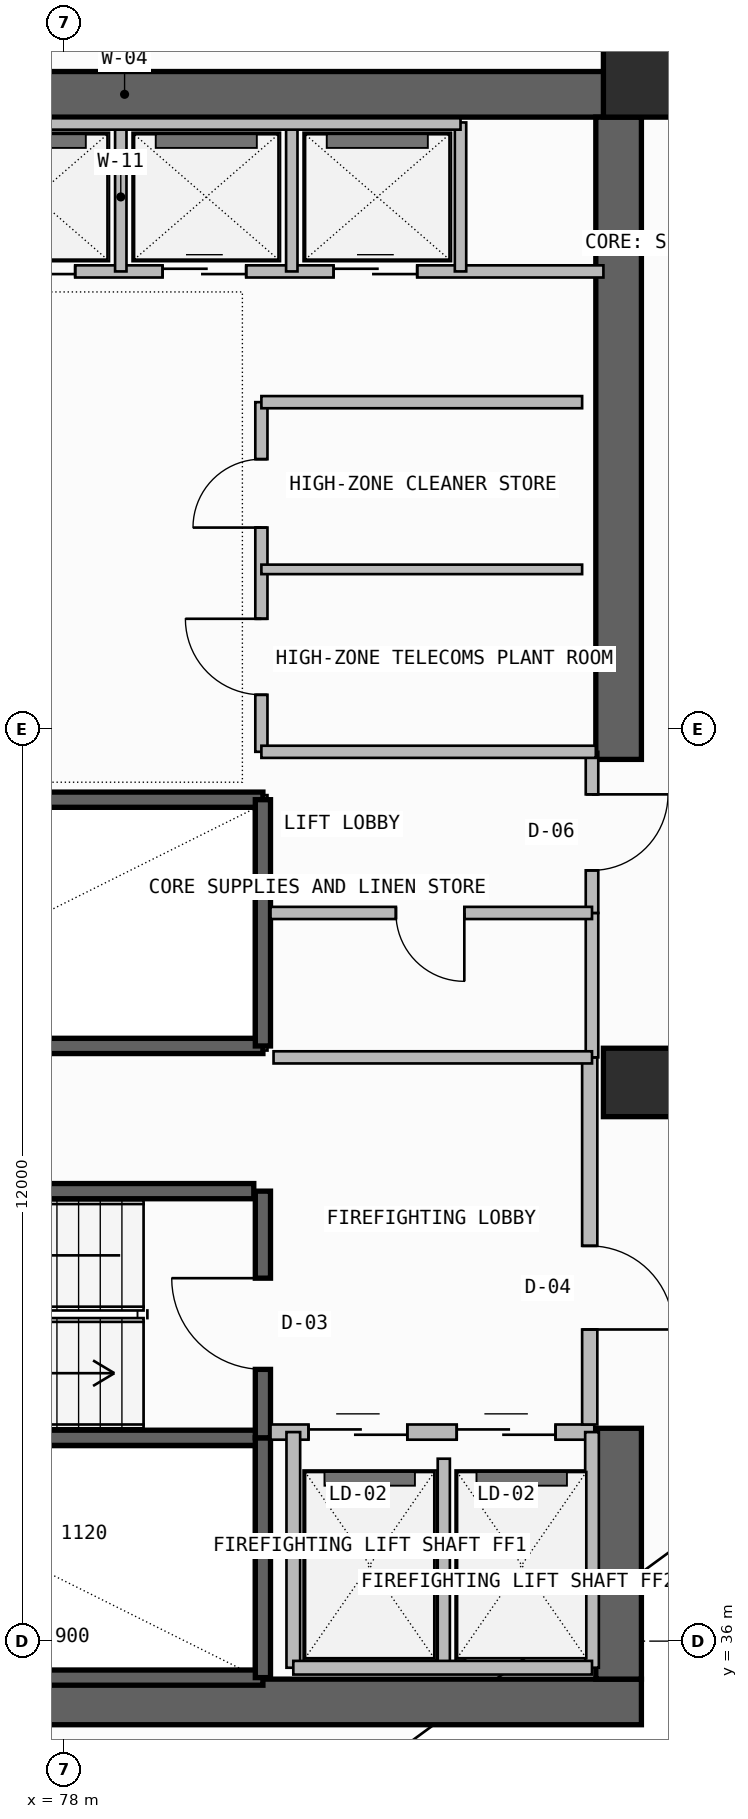
"""IFC4 building model, lengths in metres.
Left out: names, types, materials, properties, quantities, classifications, styles, units other than length and angle.
Written with IfcOpenShell. Run it as: python <this file> out.ifc"""

import sys

from ifc_helpers import new_model, si_unit, direction, frame, frame_2d, origin, origin_2d, place, context, subcontext, project, spatial, rectangle, extrude, element, fill, save


model = new_model("IFC4")
c1 = context("Model", 3, precision=1e-05, world=origin(), true_north=direction((0.0, 1.0)))
c2 = subcontext(c1, "Body", "Model", "MODEL_VIEW")
j1 = project(units=[si_unit("LENGTHUNIT", "METRE"), si_unit("PLANEANGLEUNIT", "RADIAN")], contexts=[c1])
p1 = place(None, origin())
s1 = spatial("IfcSite", under=j1, at=p1, CompositionType="ELEMENT")
p2 = place(p1, origin())
s2 = spatial("IfcBuilding", under=s1, at=p2, CompositionType="ELEMENT")
p3 = place(p2, frame((0.0, 0.0, 243.14)))
s3 = spatial("IfcBuildingStorey", under=s2, at=p3, CompositionType="ELEMENT", Elevation=243.14)
p4 = place(p3, frame((72.3, 35.2, -0.26), z_axis=(0.0, 0.0, 1.0), x_axis=(1.0, 0.0, 0.0)))
e1 = element("IfcWall", 1, at=p4, inside=s3, PredefinedType="SHEAR", context=c2, shape_type="SweptSolid", body=[
    extrude(rectangle(XDim=13.3, YDim=0.6, at=frame_2d((6.65, 0.0))), origin(), (0.0, 0.0, 1.0), 3.52),
])
p5 = place(p3, frame((85.3, 35.5, -0.26), z_axis=(0.0, 0.0, 1.0), x_axis=(0.0, 1.0, 0.0)))
e2 = element("IfcWall", 2, at=p5, inside=s3, PredefinedType="SHEAR", context=c2, shape_type="SweptSolid", body=[
    extrude(rectangle(XDim=3.3, YDim=0.6, at=frame_2d((1.65, 0.0))), origin(), (0.0, 0.0, 1.0), 3.52),
])
p6 = place(p3, frame((72.0, 56.35, -0.26), z_axis=(0.0, 0.0, 1.0), x_axis=(1.0, 0.0, 0.0)))
e3 = element("IfcWall", 3, at=p6, inside=s3, PredefinedType="SHEAR", context=c2, shape_type="SweptSolid", body=[
    extrude(rectangle(XDim=13.6, YDim=0.6, at=frame_2d((6.8, 0.0))), origin(), (0.0, 0.0, 1.0), 3.52),
])
p7 = place(p3, frame((85.3, 47.6, -0.26), z_axis=(0.0, 0.0, 1.0), x_axis=(0.0, 1.0, 0.0)))
e4 = element("IfcWall", 4, at=p7, inside=s3, PredefinedType="SHEAR", context=c2, shape_type="SweptSolid", body=[
    extrude(rectangle(XDim=8.45, YDim=0.6, at=frame_2d((4.225, 0.0))), origin(), (0.0, 0.0, 1.0), 3.52),
])
for number, where, z_axis, x_axis in (
    (5, (85.55, 43.35, 0.0), (0.0, 0.0, 1.0), (1.0, 0.0, 0.0)),
    (6, (85.55, 56.5, 0.0), (0.0, 0.0, 1.0), (1.0, 0.0, 0.0)),
):
    element("IfcColumn", number, at=place(p3, frame(where, z_axis=z_axis, x_axis=x_axis)), inside=s3, PredefinedType="COLUMN", context=c2, shape_type="SweptSolid", body=[
        extrude(rectangle(XDim=0.9, YDim=0.9, at=origin_2d()), origin(), (0.0, 0.0, 1.0), 3.52),
    ])
for number, where, z_axis, x_axis in (
    (7, (72.92, 35.52, -0.26), (0.0, 0.0, 1.0), (1.0, 0.0, 0.0)),
    (8, (72.92, 38.675, -0.26), (0.0, 0.0, 1.0), (1.0, 0.0, 0.0)),
):
    element("IfcWall", number, at=place(p3, frame(where, z_axis=z_axis, x_axis=x_axis)), inside=s3, PredefinedType="SOLIDWALL", context=c2, shape_type="SweptSolid", body=[
        extrude(rectangle(XDim=7.7, YDim=0.2, at=frame_2d((3.85, 0.0))), origin(), (0.0, 0.0, 1.0), 3.52),
    ])
p8 = place(p3, frame((80.62, 35.52, -0.26), z_axis=(0.0, 0.0, 1.0), x_axis=(0.0, 1.0, 0.0)))
e9 = element("IfcWall", 9, at=p8, inside=s3, PredefinedType="SOLIDWALL", context=c2, shape_type="SweptSolid", body=[
    extrude(rectangle(XDim=3.155, YDim=0.2, at=frame_2d((1.578, 0.0))), origin(), (0.0, 0.0, 1.0), 3.52),
])
p9 = place(p3, frame((80.62, 38.675, -0.26), z_axis=(0.0, 0.0, 1.0), x_axis=(0.0, 1.0, 0.0)))
e10 = element("IfcWall", 10, at=p9, inside=s3, PredefinedType="SOLIDWALL", context=c2, shape_type="SweptSolid", body=[
    extrude(rectangle(XDim=3.245, YDim=0.2, at=frame_2d((1.623, 0.0))), origin(), (0.0, 0.0, 1.0), 3.52),
])
p10 = place(p9, frame((0.9, 0.0, 0.26)))
e11 = element("IfcOpeningElement", 11, at=p10, cuts=e10, PredefinedType="OPENING", context=c2, shape_type="SweptSolid", body=[
    extrude(rectangle(XDim=1.2, YDim=2.2, at=frame_2d((0.6, 1.1))), frame((0.0, 0.11, 0.0), z_axis=(0.0, -1.0, 0.0), x_axis=(1.0, 0.0, 0.0)), (0.0, 0.0, 1.0), 0.22),
])
p11 = place(p3, frame((80.72, 38.75, 0.0), z_axis=(0.0, 0.0, 1.0), x_axis=(1.0, 0.0, 0.0)))
e12 = element("IfcWall", 12, at=p11, inside=s3, PredefinedType="SOLIDWALL", context=c2, shape_type="SweptSolid", body=[
    extrude(rectangle(XDim=4.26, YDim=0.2, at=frame_2d((2.13, 0.0))), origin(), (0.0, 0.0, 1.0), 3.26),
])
p12 = place(p11, frame((0.5, 0.0, 0.0)))
e13 = element("IfcOpeningElement", 13, at=p12, cuts=e12, PredefinedType="OPENING", context=c2, shape_type="SweptSolid", body=[
    extrude(rectangle(XDim=1.3, YDim=2.3, at=frame_2d((0.65, 1.15))), frame((0.0, 0.11, 0.0), z_axis=(0.0, -1.0, 0.0), x_axis=(1.0, 0.0, 0.0)), (0.0, 0.0, 1.0), 0.22),
])
p13 = place(p11, frame((2.45, 0.0, 0.0)))
e14 = element("IfcOpeningElement", 14, at=p13, cuts=e12, PredefinedType="OPENING", context=c2, shape_type="SweptSolid", body=[
    extrude(rectangle(XDim=1.3, YDim=2.3, at=frame_2d((0.65, 1.15))), frame((0.0, 0.11, 0.0), z_axis=(0.0, -1.0, 0.0), x_axis=(1.0, 0.0, 0.0)), (0.0, 0.0, 1.0), 0.22),
])
p14 = place(p3, frame((83.0, 35.65, 0.0), z_axis=(0.0, 0.0, 1.0), x_axis=(0.0, 1.0, 0.0)))
e15 = element("IfcWall", 15, at=p14, inside=s3, PredefinedType="PLUMBINGWALL", context=c2, shape_type="SweptSolid", body=[
    extrude(rectangle(XDim=2.75, YDim=0.16, at=frame_2d((1.375, 0.0))), origin(), (0.0, 0.0, 1.0), 3.26),
])
for number, where, z_axis, x_axis in (
    (16, (84.95, 35.65, 0.0), (0.0, 0.0, 1.0), (0.0, 1.0, 0.0)),
    (17, (81.02, 35.65, 0.0), (0.0, 0.0, 1.0), (0.0, 1.0, 0.0)),
):
    element("IfcWall", number, at=place(p3, frame(where, z_axis=z_axis, x_axis=x_axis)), inside=s3, PredefinedType="SOLIDWALL", context=c2, shape_type="SweptSolid", body=[
        extrude(rectangle(XDim=3.1, YDim=0.18, at=frame_2d((1.55, 0.0))), origin(), (0.0, 0.0, 1.0), 3.26),
    ])
p15 = place(p3, frame((81.02, 35.65, 0.0), z_axis=(0.0, 0.0, 1.0), x_axis=(1.0, 0.0, 0.0)))
e18 = element("IfcWall", 18, at=p15, inside=s3, PredefinedType="SOLIDWALL", context=c2, shape_type="SweptSolid", body=[
    extrude(rectangle(XDim=3.93, YDim=0.18, at=frame_2d((1.965, 0.0))), origin(), (0.0, 0.0, 1.0), 3.26),
])
p16 = place(p3, frame((84.92, 38.85, 0.0), z_axis=(0.0, 0.0, 1.0), x_axis=(0.0, 1.0, 0.0)))
e19 = element("IfcWall", 19, at=p16, inside=s3, PredefinedType="SOLIDWALL", context=c2, shape_type="SweptSolid", body=[
    extrude(rectangle(XDim=4.83, YDim=0.2, at=frame_2d((2.415, 0.0))), origin(), (0.0, 0.0, 1.0), 3.26),
])
p17 = place(p16, frame((1.25, 0.0, 0.0)))
e20 = element("IfcOpeningElement", 20, at=p17, cuts=e19, PredefinedType="OPENING", context=c2, shape_type="SweptSolid", body=[
    extrude(rectangle(XDim=1.1, YDim=2.2, at=frame_2d((0.55, 1.1))), frame((0.0, 0.11, 0.0), z_axis=(0.0, -1.0, 0.0), x_axis=(1.0, 0.0, 0.0)), (0.0, 0.0, 1.0), 0.22),
])
p18 = place(p3, frame((72.92, 41.92, -0.26), z_axis=(0.0, 0.0, 1.0), x_axis=(1.0, 0.0, 0.0)))
e21 = element("IfcWall", 21, at=p18, inside=s3, PredefinedType="SOLIDWALL", context=c2, shape_type="SweptSolid", body=[
    extrude(rectangle(XDim=7.58, YDim=0.2, at=frame_2d((3.79, 0.0))), origin(), (0.0, 0.0, 1.0), 3.52),
])
for number, where, z_axis, x_axis in (
    (22, (72.92, 43.83, -0.26), (0.0, 0.0, 1.0), (1.0, 0.0, 0.0)),
    (23, (72.92, 47.07, -0.26), (0.0, 0.0, 1.0), (1.0, 0.0, 0.0)),
):
    element("IfcWall", number, at=place(p3, frame(where, z_axis=z_axis, x_axis=x_axis)), inside=s3, PredefinedType="SOLIDWALL", context=c2, shape_type="SweptSolid", body=[
        extrude(rectangle(XDim=7.7, YDim=0.2, at=frame_2d((3.85, 0.0))), origin(), (0.0, 0.0, 1.0), 3.52),
    ])
p19 = place(p3, frame((80.62, 43.83, -0.26), z_axis=(0.0, 0.0, 1.0), x_axis=(0.0, 1.0, 0.0)))
e24 = element("IfcWall", 24, at=p19, inside=s3, PredefinedType="SOLIDWALL", context=c2, shape_type="SweptSolid", body=[
    extrude(rectangle(XDim=3.24, YDim=0.2, at=frame_2d((1.62, 0.0))), origin(), (0.0, 0.0, 1.0), 3.52),
])
p20 = place(p3, frame((84.95, 43.68, 0.0), z_axis=(0.0, 0.0, 1.0), x_axis=(0.0, 1.0, 0.0)))
e25 = element("IfcWall", 25, at=p20, inside=s3, PredefinedType="PLUMBINGWALL", context=c2, shape_type="SweptSolid", body=[
    extrude(rectangle(XDim=1.9, YDim=0.165, at=frame_2d((0.95, 0.0))), origin(), (0.0, 0.0, 1.0), 3.26),
])
p21 = place(p3, frame((84.95, 45.58, 0.0), z_axis=(0.0, 0.0, 1.0), x_axis=(0.0, 1.0, 0.0)))
e26 = element("IfcWall", 26, at=p21, inside=s3, PredefinedType="PARTITIONING", context=c2, shape_type="SweptSolid", body=[
    extrude(rectangle(XDim=2.12, YDim=0.165, at=frame_2d((1.06, 0.0))), origin(), (0.0, 0.0, 1.0), 3.26),
])
p22 = place(p21, frame((0.56, 0.0, 0.0)))
e27 = element("IfcOpeningElement", 27, at=p22, cuts=e26, PredefinedType="OPENING", context=c2, shape_type="SweptSolid", body=[
    extrude(rectangle(XDim=1.0, YDim=2.2, at=frame_2d((0.5, 1.1))), frame((0.0, 0.093, 0.0), z_axis=(0.0, -1.0, 0.0), x_axis=(1.0, 0.0, 0.0)), (0.0, 0.0, 1.0), 0.185),
])
p23 = place(p3, frame((80.72, 45.58, 0.0), z_axis=(0.0, 0.0, 1.0), x_axis=(1.0, 0.0, 0.0)))
e28 = element("IfcWall", 28, at=p23, inside=s3, PredefinedType="PLUMBINGWALL", context=c2, shape_type="SweptSolid", body=[
    extrude(rectangle(XDim=4.23, YDim=0.16, at=frame_2d((2.115, 0.0))), origin(), (0.0, 0.0, 1.0), 3.26),
])
p24 = place(p23, frame((1.65, 0.0, 0.0)))
e29 = element("IfcOpeningElement", 29, at=p24, cuts=e28, PredefinedType="OPENING", context=c2, shape_type="SweptSolid", body=[
    extrude(rectangle(XDim=0.9, YDim=2.1, at=frame_2d((0.45, 1.05))), frame((0.0, 0.09, 0.0), z_axis=(0.0, -1.0, 0.0), x_axis=(1.0, 0.0, 0.0)), (0.0, 0.0, 1.0), 0.18),
])
p25 = place(p3, frame((80.76, 43.68, 0.0), z_axis=(0.0, 0.0, 1.0), x_axis=(1.0, 0.0, 0.0)))
e30 = element("IfcWall", 30, at=p25, inside=s3, PredefinedType="PLUMBINGWALL", context=c2, shape_type="SweptSolid", body=[
    extrude(rectangle(XDim=4.19, YDim=0.16, at=frame_2d((2.095, 0.0))), origin(), (0.0, 0.0, 1.0), 3.26),
])
p26 = place(p3, frame((80.6, 47.7, 0.0), z_axis=(0.0, 0.0, 1.0), x_axis=(0.0, 1.0, 0.0)))
e31 = element("IfcWall", 31, at=p26, inside=s3, PredefinedType="SOLIDWALL", context=c2, shape_type="SweptSolid", body=[
    extrude(rectangle(XDim=4.6, YDim=0.16, at=frame_2d((2.3, 0.0))), origin(), (0.0, 0.0, 1.0), 3.26),
])
p27 = place(p26, frame((0.75, 0.0, 0.0)))
e32 = element("IfcOpeningElement", 32, at=p27, cuts=e31, PredefinedType="OPENING", context=c2, shape_type="SweptSolid", body=[
    extrude(rectangle(XDim=1.0, YDim=2.2, at=frame_2d((0.5, 1.1))), frame((0.0, 0.09, 0.0), z_axis=(0.0, -1.0, 0.0), x_axis=(1.0, 0.0, 0.0)), (0.0, 0.0, 1.0), 0.18),
])
p28 = place(p26, frame((2.95, 0.0, 0.0)))
e33 = element("IfcOpeningElement", 33, at=p28, cuts=e31, PredefinedType="OPENING", context=c2, shape_type="SweptSolid", body=[
    extrude(rectangle(XDim=0.9, YDim=2.1, at=frame_2d((0.45, 1.05))), frame((0.0, 0.09, 0.0), z_axis=(0.0, -1.0, 0.0), x_axis=(1.0, 0.0, 0.0)), (0.0, 0.0, 1.0), 0.18),
])
p29 = place(p3, frame((80.6, 47.7, 0.0), z_axis=(0.0, 0.0, 1.0), x_axis=(1.0, 0.0, 0.0)))
e34 = element("IfcWall", 34, at=p29, inside=s3, PredefinedType="SOLIDWALL", context=c2, shape_type="SweptSolid", body=[
    extrude(rectangle(XDim=4.4, YDim=0.16, at=frame_2d((2.2, 0.0))), origin(), (0.0, 0.0, 1.0), 3.26),
])
p30 = place(p3, frame((80.6, 52.3, 0.0), z_axis=(0.0, 0.0, 1.0), x_axis=(1.0, 0.0, 0.0)))
e35 = element("IfcWall", 35, at=p30, inside=s3, PredefinedType="SOLIDWALL", context=c2, shape_type="SweptSolid", body=[
    extrude(rectangle(XDim=4.22, YDim=0.16, at=frame_2d((2.11, 0.0))), origin(), (0.0, 0.0, 1.0), 3.26),
])
p31 = place(p3, frame((80.6, 50.1, 0.0), z_axis=(0.0, 0.0, 1.0), x_axis=(1.0, 0.0, 0.0)))
e36 = element("IfcWall", 36, at=p31, inside=s3, PredefinedType="PARTITIONING", context=c2, shape_type="SweptSolid", body=[
    extrude(rectangle(XDim=4.22, YDim=0.125, at=frame_2d((2.11, 0.0))), origin(), (0.0, 0.0, 1.0), 3.26),
])
p32 = place(p3, frame((73.02, 54.02, 0.0), z_axis=(0.0, 0.0, 1.0), x_axis=(1.0, 0.0, 0.0)))
e37 = element("IfcWall", 37, at=p32, inside=s3, PredefinedType="SOLIDWALL", context=c2, shape_type="SweptSolid", body=[
    extrude(rectangle(XDim=12.08, YDim=0.16, at=frame_2d((6.04, 0.0))), origin(), (0.0, 0.0, 1.0), 3.26),
])
p33 = place(p32, frame((4.03, 0.0, 0.0)))
e38 = element("IfcOpeningElement", 38, at=p33, cuts=e37, PredefinedType="OPENING", context=c2, shape_type="SweptSolid", body=[
    extrude(rectangle(XDim=1.1, YDim=2.25, at=frame_2d((0.55, 1.125))), frame((0.0, 0.09, 0.0), z_axis=(0.0, -1.0, 0.0), x_axis=(1.0, 0.0, 0.0)), (0.0, 0.0, 1.0), 0.18),
])
p34 = place(p32, frame((6.28, 0.0, 0.0)))
e39 = element("IfcOpeningElement", 39, at=p34, cuts=e37, PredefinedType="OPENING", context=c2, shape_type="SweptSolid", body=[
    extrude(rectangle(XDim=1.1, YDim=2.25, at=frame_2d((0.55, 1.125))), frame((0.0, 0.09, 0.0), z_axis=(0.0, -1.0, 0.0), x_axis=(1.0, 0.0, 0.0)), (0.0, 0.0, 1.0), 0.18),
])
p35 = place(p32, frame((8.53, 0.0, 0.0)))
e40 = element("IfcOpeningElement", 40, at=p35, cuts=e37, PredefinedType="OPENING", context=c2, shape_type="SweptSolid", body=[
    extrude(rectangle(XDim=1.1, YDim=2.25, at=frame_2d((0.55, 1.125))), frame((0.0, 0.09, 0.0), z_axis=(0.0, -1.0, 0.0), x_axis=(1.0, 0.0, 0.0)), (0.0, 0.0, 1.0), 0.18),
])
for number, where, z_axis, x_axis in (
    (41, (78.75, 54.02, 0.0), (0.0, 0.0, 1.0), (0.0, 1.0, 0.0)),
    (42, (81.0, 54.02, 0.0), (0.0, 0.0, 1.0), (0.0, 1.0, 0.0)),
):
    element("IfcWall", number, at=place(p3, frame(where, z_axis=z_axis, x_axis=x_axis)), inside=s3, PredefinedType="PLUMBINGWALL", context=c2, shape_type="SweptSolid", body=[
        extrude(rectangle(XDim=1.96, YDim=0.15, at=frame_2d((0.98, 0.0))), origin(), (0.0, 0.0, 1.0), 3.26),
    ])
p36 = place(p3, frame((83.22, 54.02, 0.0), z_axis=(0.0, 0.0, 1.0), x_axis=(0.0, 1.0, 0.0)))
e43 = element("IfcWall", 43, at=p36, inside=s3, PredefinedType="SOLIDWALL", context=c2, shape_type="SweptSolid", body=[
    extrude(rectangle(XDim=1.96, YDim=0.15, at=frame_2d((0.98, 0.0))), origin(), (0.0, 0.0, 1.0), 3.26),
])
p37 = place(p3, frame((76.52, 55.96, 0.0), z_axis=(0.0, 0.0, 1.0), x_axis=(1.0, 0.0, 0.0)))
e44 = element("IfcWall", 44, at=p37, inside=s3, PredefinedType="SOLIDWALL", context=c2, shape_type="SweptSolid", body=[
    extrude(rectangle(XDim=6.7, YDim=0.15, at=frame_2d((3.35, 0.0))), origin(), (0.0, 0.0, 1.0), 3.26),
])
p38 = place(p10, origin())
e45 = element("IfcDoor", 45, at=p38, inside=s3, OperationType="SINGLE_SWING_RIGHT", PredefinedType="USERDEFINED", context=c2, shape_type="SweptSolid", body=[
    extrude(rectangle(XDim=1.2, YDim=2.2, at=frame_2d((0.6, 1.1))), frame((0.0, 0.025, 0.0), z_axis=(0.0, -1.0, 0.0), x_axis=(1.0, 0.0, 0.0)), (0.0, 0.0, 1.0), 0.05),
])
fill(e11, e45)
p39 = place(p12, origin())
e46 = element("IfcDoor", 46, at=p39, inside=s3, OperationType="DOUBLE_DOOR_SLIDING", PredefinedType="DOOR", context=c2, shape_type="SweptSolid", body=[
    extrude(rectangle(XDim=1.3, YDim=2.3, at=frame_2d((0.65, 1.15))), frame((0.0, 0.025, 0.0), z_axis=(0.0, -1.0, 0.0), x_axis=(1.0, 0.0, 0.0)), (0.0, 0.0, 1.0), 0.05),
])
fill(e13, e46)
p40 = place(p13, origin())
e47 = element("IfcDoor", 47, at=p40, inside=s3, OperationType="DOUBLE_DOOR_SLIDING", PredefinedType="DOOR", context=c2, shape_type="SweptSolid", body=[
    extrude(rectangle(XDim=1.3, YDim=2.3, at=frame_2d((0.65, 1.15))), frame((0.0, 0.025, 0.0), z_axis=(0.0, -1.0, 0.0), x_axis=(1.0, 0.0, 0.0)), (0.0, 0.0, 1.0), 0.05),
])
fill(e14, e47)
p41 = place(p17, frame((1.1, 0.0, 0.0), z_axis=(0.0, 0.0, 1.0), x_axis=(-1.0, 0.0, 0.0)))
e48 = element("IfcDoor", 48, at=p41, inside=s3, OperationType="SINGLE_SWING_RIGHT", PredefinedType="DOOR", context=c2, shape_type="SweptSolid", body=[
    extrude(rectangle(XDim=1.1, YDim=2.2, at=frame_2d((0.55, 1.1))), frame((0.0, 0.025, 0.0), z_axis=(0.0, -1.0, 0.0), x_axis=(1.0, 0.0, 0.0)), (0.0, 0.0, 1.0), 0.05),
])
fill(e20, e48)
p42 = place(p22, frame((1.0, 0.0, 0.0), z_axis=(0.0, 0.0, 1.0), x_axis=(-1.0, 0.0, 0.0)))
e49 = element("IfcDoor", 49, at=p42, inside=s3, OperationType="SINGLE_SWING_LEFT", PredefinedType="DOOR", context=c2, shape_type="SweptSolid", body=[
    extrude(rectangle(XDim=1.0, YDim=2.2, at=frame_2d((0.5, 1.1))), frame((0.0, 0.025, 0.0), z_axis=(0.0, -1.0, 0.0), x_axis=(1.0, 0.0, 0.0)), (0.0, 0.0, 1.0), 0.05),
])
fill(e27, e49)
p43 = place(p24, frame((0.9, 0.0, 0.0), z_axis=(0.0, 0.0, 1.0), x_axis=(-1.0, 0.0, 0.0)))
e50 = element("IfcDoor", 50, at=p43, inside=s3, OperationType="SINGLE_SWING_LEFT", PredefinedType="DOOR", context=c2, shape_type="SweptSolid", body=[
    extrude(rectangle(XDim=0.9, YDim=2.1, at=frame_2d((0.45, 1.05))), frame((0.0, 0.025, 0.0), z_axis=(0.0, -1.0, 0.0), x_axis=(1.0, 0.0, 0.0)), (0.0, 0.0, 1.0), 0.05),
])
fill(e29, e50)
p44 = place(p27, origin())
e51 = element("IfcDoor", 51, at=p44, inside=s3, OperationType="SINGLE_SWING_RIGHT", PredefinedType="DOOR", context=c2, shape_type="SweptSolid", body=[
    extrude(rectangle(XDim=1.0, YDim=2.2, at=frame_2d((0.5, 1.1))), frame((0.0, 0.025, 0.0), z_axis=(0.0, -1.0, 0.0), x_axis=(1.0, 0.0, 0.0)), (0.0, 0.0, 1.0), 0.05),
])
fill(e32, e51)
p45 = place(p28, origin())
e52 = element("IfcDoor", 52, at=p45, inside=s3, OperationType="SINGLE_SWING_LEFT", PredefinedType="DOOR", context=c2, shape_type="SweptSolid", body=[
    extrude(rectangle(XDim=0.9, YDim=2.1, at=frame_2d((0.45, 1.05))), frame((0.0, 0.025, 0.0), z_axis=(0.0, -1.0, 0.0), x_axis=(1.0, 0.0, 0.0)), (0.0, 0.0, 1.0), 0.05),
])
fill(e33, e52)
p46 = place(p33, origin())
e53 = element("IfcDoor", 53, at=p46, inside=s3, OperationType="DOUBLE_DOOR_SLIDING", PredefinedType="DOOR", context=c2, shape_type="SweptSolid", body=[
    extrude(rectangle(XDim=1.1, YDim=2.25, at=frame_2d((0.55, 1.125))), frame((0.0, 0.025, 0.0), z_axis=(0.0, -1.0, 0.0), x_axis=(1.0, 0.0, 0.0)), (0.0, 0.0, 1.0), 0.05),
])
fill(e38, e53)
p47 = place(p34, origin())
e54 = element("IfcDoor", 54, at=p47, inside=s3, OperationType="DOUBLE_DOOR_SLIDING", PredefinedType="DOOR", context=c2, shape_type="SweptSolid", body=[
    extrude(rectangle(XDim=1.1, YDim=2.25, at=frame_2d((0.55, 1.125))), frame((0.0, 0.025, 0.0), z_axis=(0.0, -1.0, 0.0), x_axis=(1.0, 0.0, 0.0)), (0.0, 0.0, 1.0), 0.05),
])
fill(e39, e54)
p48 = place(p35, origin())
e55 = element("IfcDoor", 55, at=p48, inside=s3, OperationType="DOUBLE_DOOR_SLIDING", PredefinedType="DOOR", context=c2, shape_type="SweptSolid", body=[
    extrude(rectangle(XDim=1.1, YDim=2.25, at=frame_2d((0.55, 1.125))), frame((0.0, 0.025, 0.0), z_axis=(0.0, -1.0, 0.0), x_axis=(1.0, 0.0, 0.0)), (0.0, 0.0, 1.0), 0.05),
])
fill(e40, e55)
save(model, sys.argv[1])
